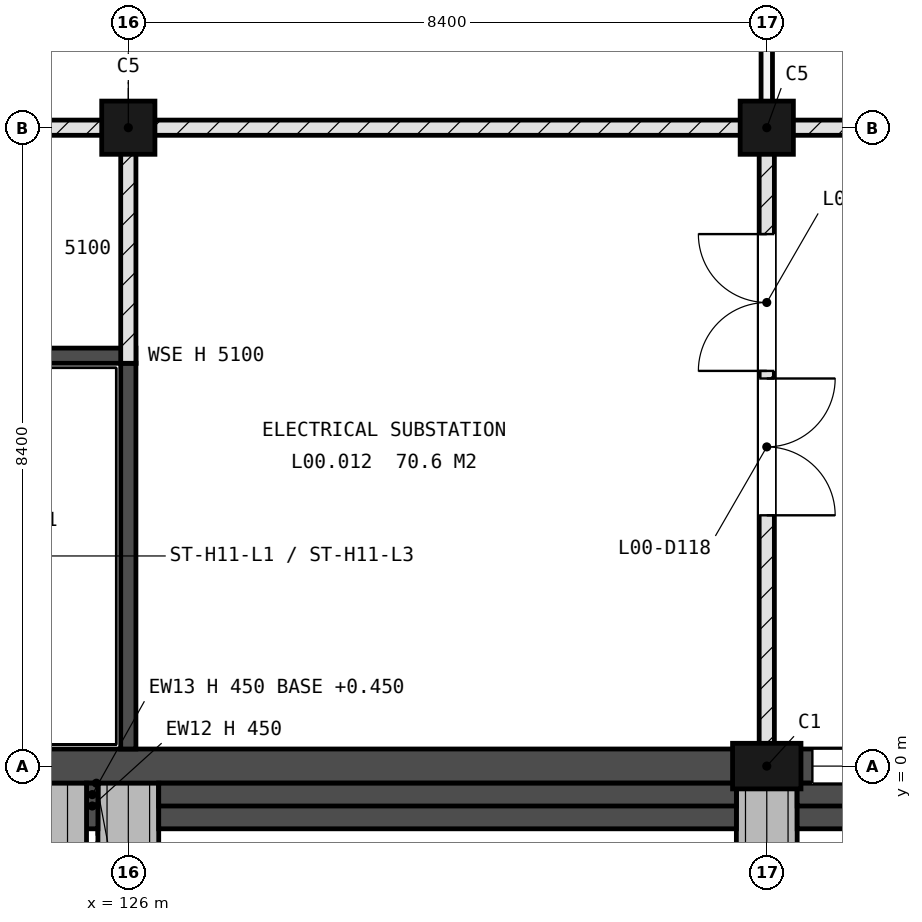
"""IFC4 building model, lengths in metres.
Left out: names, types, materials, properties, quantities, classifications, styles, units other than length and angle.
Written with IfcOpenShell. Run it as: python <this file> out.ifc"""

import sys

from ifc_helpers import new_model, si_unit, direction, frame, frame_2d, origin, origin_2d, place, context, subcontext, project, spatial, rectangle, extrude, element, fill, save


model = new_model("IFC4")
c1 = context("Model", 3, precision=1e-05, world=origin(), true_north=direction((0.0, 1.0)))
c2 = subcontext(c1, "Body", "Model", "MODEL_VIEW")
j1 = project(units=[si_unit("LENGTHUNIT", "METRE"), si_unit("PLANEANGLEUNIT", "RADIAN")], contexts=[c1])
p1 = place(None, origin())
s1 = spatial("IfcSite", under=j1, at=p1, CompositionType="ELEMENT")
p2 = place(p1, origin())
s2 = spatial("IfcBuilding", under=s1, at=p2, CompositionType="ELEMENT")
p3 = place(p2, origin())
s3 = spatial("IfcBuildingStorey", under=s2, at=p3, CompositionType="ELEMENT", Elevation=0.0)
p4 = place(p3, frame((126.0, 8.4, -0.3), z_axis=(0.0, 0.0, 1.0), x_axis=(1.0, 0.0, 0.0)))
e1 = element("IfcColumn", 1, at=p4, inside=s3, PredefinedType="COLUMN", context=c2, shape_type="SweptSolid", body=[
    extrude(rectangle(XDim=0.7, YDim=0.7, at=origin_2d()), origin(), (0.0, 0.0, 1.0), 5.4),
])
p5 = place(p3, frame((134.4, 0.0, -0.3), z_axis=(0.0, 0.0, 1.0), x_axis=(1.0, 0.0, 0.0)))
e2 = element("IfcColumn", 2, at=p5, inside=s3, PredefinedType="PILASTER", context=c2, shape_type="SweptSolid", body=[
    extrude(rectangle(XDim=0.9, YDim=0.6, at=origin_2d()), origin(), (0.0, 0.0, 1.0), 5.4),
])
p6 = place(p3, frame((134.4, 8.4, -0.3), z_axis=(0.0, 0.0, 1.0), x_axis=(1.0, 0.0, 0.0)))
e3 = element("IfcColumn", 3, at=p6, inside=s3, PredefinedType="COLUMN", context=c2, shape_type="SweptSolid", body=[
    extrude(rectangle(XDim=0.7, YDim=0.7, at=origin_2d()), origin(), (0.0, 0.0, 1.0), 5.4),
])
p7 = place(p3, frame((0.0, 0.0, -0.3), z_axis=(0.0, 0.0, 1.0), x_axis=(1.0, 0.0, 0.0)))
e4 = element("IfcWall", 4, at=p7, inside=s3, PredefinedType="SOLIDWALL", context=c2, shape_type="SweptSolid", body=[
    extrude(rectangle(XDim=168.0, YDim=0.45, at=frame_2d((84.0, 0.0))), origin(), (0.0, 0.0, 1.0), 5.4),
])
p8 = place(p7, frame((34.8, 0.0, 2.7)))
e5 = element("IfcOpeningElement", 5, at=p8, cuts=e4, PredefinedType="OPENING", context=c2, shape_type="SweptSolid", body=[
    extrude(rectangle(XDim=1.8, YDim=1.2, at=frame_2d((0.9, 0.6))), frame((0.0, 0.235, 0.0), z_axis=(0.0, -1.0, 0.0), x_axis=(1.0, 0.0, 0.0)), (0.0, 0.0, 1.0), 0.47),
])
p9 = place(p7, frame((69.075, 0.0, 1.5)))
e6 = element("IfcOpeningElement", 6, at=p9, cuts=e4, PredefinedType="OPENING", context=c2, shape_type="SweptSolid", body=[
    extrude(rectangle(XDim=0.45, YDim=2.4, at=frame_2d((0.225, 1.2))), frame((0.0, 0.235, 0.0), z_axis=(0.0, -1.0, 0.0), x_axis=(1.0, 0.0, 0.0)), (0.0, 0.0, 1.0), 0.47),
])
p10 = place(p7, frame((73.275, 0.0, 1.5)))
e7 = element("IfcOpeningElement", 7, at=p10, cuts=e4, PredefinedType="OPENING", context=c2, shape_type="SweptSolid", body=[
    extrude(rectangle(XDim=0.45, YDim=2.4, at=frame_2d((0.225, 1.2))), frame((0.0, 0.235, 0.0), z_axis=(0.0, -1.0, 0.0), x_axis=(1.0, 0.0, 0.0)), (0.0, 0.0, 1.0), 0.47),
])
p11 = place(p7, frame((135.0, 0.0, 2.7)))
e8 = element("IfcOpeningElement", 8, at=p11, cuts=e4, PredefinedType="OPENING", context=c2, shape_type="SweptSolid", body=[
    extrude(rectangle(XDim=1.8, YDim=1.2, at=frame_2d((0.9, 0.6))), frame((0.0, 0.235, 0.0), z_axis=(0.0, -1.0, 0.0), x_axis=(1.0, 0.0, 0.0)), (0.0, 0.0, 1.0), 0.47),
])
p12 = place(p7, frame((144.0, 0.0, 2.7)))
e9 = element("IfcOpeningElement", 9, at=p12, cuts=e4, PredefinedType="OPENING", context=c2, shape_type="SweptSolid", body=[
    extrude(rectangle(XDim=1.8, YDim=1.2, at=frame_2d((0.9, 0.6))), frame((0.0, 0.235, 0.0), z_axis=(0.0, -1.0, 0.0), x_axis=(1.0, 0.0, 0.0)), (0.0, 0.0, 1.0), 0.47),
])
p13 = place(p7, frame((114.6, 0.0, 0.3), z_axis=(0.0, 0.0, 1.0), x_axis=(-1.0, 0.0, 0.0)))
e10 = element("IfcOpeningElement", 10, at=p13, cuts=e4, PredefinedType="OPENING", context=c2, shape_type="SweptSolid", body=[
    extrude(rectangle(XDim=2.1, YDim=2.2, at=frame_2d((1.05, 1.1))), frame((0.0, 0.235, 0.0), z_axis=(0.0, -1.0, 0.0), x_axis=(1.0, 0.0, 0.0)), (0.0, 0.0, 1.0), 0.47),
])
p14 = place(p7, frame((117.3, 0.0, 0.3), z_axis=(0.0, 0.0, 1.0), x_axis=(-1.0, 0.0, 0.0)))
e11 = element("IfcOpeningElement", 11, at=p14, cuts=e4, PredefinedType="OPENING", context=c2, shape_type="SweptSolid", body=[
    extrude(rectangle(XDim=2.1, YDim=2.2, at=frame_2d((1.05, 1.1))), frame((0.0, 0.235, 0.0), z_axis=(0.0, -1.0, 0.0), x_axis=(1.0, 0.0, 0.0)), (0.0, 0.0, 1.0), 0.47),
])
p15 = place(p7, frame((106.05, 0.0, 0.3), z_axis=(0.0, 0.0, 1.0), x_axis=(-1.0, 0.0, 0.0)))
e12 = element("IfcOpeningElement", 12, at=p15, cuts=e4, PredefinedType="OPENING", context=c2, shape_type="SweptSolid", body=[
    extrude(rectangle(XDim=2.1, YDim=2.2, at=frame_2d((1.05, 1.1))), frame((0.0, 0.235, 0.0), z_axis=(0.0, -1.0, 0.0), x_axis=(1.0, 0.0, 0.0)), (0.0, 0.0, 1.0), 0.47),
])
p16 = place(p7, frame((57.25, 0.0, 0.3), z_axis=(0.0, 0.0, 1.0), x_axis=(-1.0, 0.0, 0.0)))
e13 = element("IfcOpeningElement", 13, at=p16, cuts=e4, PredefinedType="OPENING", context=c2, shape_type="SweptSolid", body=[
    extrude(rectangle(XDim=2.1, YDim=2.2, at=frame_2d((1.05, 1.1))), frame((0.0, 0.235, 0.0), z_axis=(0.0, -1.0, 0.0), x_axis=(1.0, 0.0, 0.0)), (0.0, 0.0, 1.0), 0.47),
])
p17 = place(p7, frame((120.75, 0.0, 0.3), z_axis=(0.0, 0.0, 1.0), x_axis=(-1.0, 0.0, 0.0)))
e14 = element("IfcOpeningElement", 14, at=p17, cuts=e4, PredefinedType="OPENING", context=c2, shape_type="SweptSolid", body=[
    extrude(rectangle(XDim=2.1, YDim=2.2, at=frame_2d((1.05, 1.1))), frame((0.0, 0.235, 0.0), z_axis=(0.0, -1.0, 0.0), x_axis=(1.0, 0.0, 0.0)), (0.0, 0.0, 1.0), 0.47),
])
p18 = place(p7, frame((124.95, 0.0, 0.3), z_axis=(0.0, 0.0, 1.0), x_axis=(-1.0, 0.0, 0.0)))
e15 = element("IfcOpeningElement", 15, at=p18, cuts=e4, PredefinedType="OPENING", context=c2, shape_type="SweptSolid", body=[
    extrude(rectangle(XDim=2.1, YDim=2.2, at=frame_2d((1.05, 1.1))), frame((0.0, 0.235, 0.0), z_axis=(0.0, -1.0, 0.0), x_axis=(1.0, 0.0, 0.0)), (0.0, 0.0, 1.0), 0.47),
])
p19 = place(p7, frame((19.45, 0.0, 0.3), z_axis=(0.0, 0.0, 1.0), x_axis=(-1.0, 0.0, 0.0)))
e16 = element("IfcOpeningElement", 16, at=p19, cuts=e4, PredefinedType="OPENING", context=c2, shape_type="SweptSolid", body=[
    extrude(rectangle(XDim=2.1, YDim=2.2, at=frame_2d((1.05, 1.1))), frame((0.0, 0.235, 0.0), z_axis=(0.0, -1.0, 0.0), x_axis=(1.0, 0.0, 0.0)), (0.0, 0.0, 1.0), 0.47),
])
p20 = place(p7, frame((162.25, 0.0, 0.3), z_axis=(0.0, 0.0, 1.0), x_axis=(-1.0, 0.0, 0.0)))
e17 = element("IfcOpeningElement", 17, at=p20, cuts=e4, PredefinedType="OPENING", context=c2, shape_type="SweptSolid", body=[
    extrude(rectangle(XDim=2.1, YDim=2.2, at=frame_2d((1.05, 1.1))), frame((0.0, 0.235, 0.0), z_axis=(0.0, -1.0, 0.0), x_axis=(1.0, 0.0, 0.0)), (0.0, 0.0, 1.0), 0.47),
])
p21 = place(p7, frame((4.8, 0.0, 0.3), z_axis=(0.0, 0.0, 1.0), x_axis=(-1.0, 0.0, 0.0)))
e18 = element("IfcOpeningElement", 18, at=p21, cuts=e4, PredefinedType="OPENING", context=c2, shape_type="SweptSolid", body=[
    extrude(rectangle(XDim=1.2, YDim=2.2, at=frame_2d((0.6, 1.1))), frame((0.0, 0.235, 0.0), z_axis=(0.0, -1.0, 0.0), x_axis=(1.0, 0.0, 0.0)), (0.0, 0.0, 1.0), 0.47),
])
p22 = place(p7, frame((64.8, 0.0, 0.3), z_axis=(0.0, 0.0, 1.0), x_axis=(-1.0, 0.0, 0.0)))
e19 = element("IfcOpeningElement", 19, at=p22, cuts=e4, PredefinedType="OPENING", context=c2, shape_type="SweptSolid", body=[
    extrude(rectangle(XDim=1.2, YDim=2.2, at=frame_2d((0.6, 1.1))), frame((0.0, 0.235, 0.0), z_axis=(0.0, -1.0, 0.0), x_axis=(1.0, 0.0, 0.0)), (0.0, 0.0, 1.0), 0.47),
])
p23 = place(p7, frame((81.0, 0.0, 0.3), z_axis=(0.0, 0.0, 1.0), x_axis=(-1.0, 0.0, 0.0)))
e20 = element("IfcOpeningElement", 20, at=p23, cuts=e4, PredefinedType="OPENING", context=c2, shape_type="SweptSolid", body=[
    extrude(rectangle(XDim=2.4, YDim=2.4, at=frame_2d((1.2, 1.2))), frame((0.0, 0.235, 0.0), z_axis=(0.0, -1.0, 0.0), x_axis=(1.0, 0.0, 0.0)), (0.0, 0.0, 1.0), 0.47),
])
p24 = place(p7, frame((97.8, 0.0, 0.3), z_axis=(0.0, 0.0, 1.0), x_axis=(-1.0, 0.0, 0.0)))
e21 = element("IfcOpeningElement", 21, at=p24, cuts=e4, PredefinedType="OPENING", context=c2, shape_type="SweptSolid", body=[
    extrude(rectangle(XDim=2.4, YDim=2.4, at=frame_2d((1.2, 1.2))), frame((0.0, 0.235, 0.0), z_axis=(0.0, -1.0, 0.0), x_axis=(1.0, 0.0, 0.0)), (0.0, 0.0, 1.0), 0.47),
])
p25 = place(p7, frame((139.8, 0.0, 0.3), z_axis=(0.0, 0.0, 1.0), x_axis=(-1.0, 0.0, 0.0)))
e22 = element("IfcOpeningElement", 22, at=p25, cuts=e4, PredefinedType="OPENING", context=c2, shape_type="SweptSolid", body=[
    extrude(rectangle(XDim=2.4, YDim=2.1, at=frame_2d((1.2, 1.05))), frame((0.0, 0.235, 0.0), z_axis=(0.0, -1.0, 0.0), x_axis=(1.0, 0.0, 0.0)), (0.0, 0.0, 1.0), 0.47),
])
p26 = place(p7, frame((156.3, 0.0, 0.3), z_axis=(0.0, 0.0, 1.0), x_axis=(-1.0, 0.0, 0.0)))
e23 = element("IfcOpeningElement", 23, at=p26, cuts=e4, PredefinedType="OPENING", context=c2, shape_type="SweptSolid", body=[
    extrude(rectangle(XDim=1.8, YDim=2.2, at=frame_2d((0.9, 1.1))), frame((0.0, 0.235, 0.0), z_axis=(0.0, -1.0, 0.0), x_axis=(1.0, 0.0, 0.0)), (0.0, 0.0, 1.0), 0.47),
])
for number, where, z_axis, x_axis in (
    (24, (126.0, -0.225, 0.0), (0.0, 0.0, 1.0), (0.0, -1.0, 0.0)),
    (25, (134.4, -0.225, 0.0), (0.0, 0.0, 1.0), (0.0, -1.0, 0.0)),
):
    element("IfcWall", number, at=place(p3, frame(where, z_axis=z_axis, x_axis=x_axis)), inside=s3, PredefinedType="SOLIDWALL", context=c2, shape_type="SweptSolid", body=[
        extrude(rectangle(XDim=0.9, YDim=0.8, at=frame_2d((0.45, 0.0))), origin(), (0.0, 0.0, 1.0), 5.1),
    ])
p27 = place(p3, frame((125.45, -0.525, 0.0), z_axis=(0.0, 0.0, 1.0), x_axis=(1.0, 0.0, 0.0)))
e26 = element("IfcWall", 26, at=p27, inside=s3, PredefinedType="SOLIDWALL", context=c2, shape_type="SweptSolid", body=[
    extrude(rectangle(XDim=0.15, YDim=0.6, at=frame_2d((0.075, 0.0))), origin(), (0.0, 0.0, 1.0), 0.45),
])
p28 = place(p3, frame((125.45, -0.375, 0.45), z_axis=(0.0, 0.0, 1.0), x_axis=(1.0, 0.0, 0.0)))
e27 = element("IfcWall", 27, at=p28, inside=s3, PredefinedType="SOLIDWALL", context=c2, shape_type="SweptSolid", body=[
    extrude(rectangle(XDim=0.15, YDim=0.3, at=frame_2d((0.075, 0.0))), origin(), (0.0, 0.0, 1.0), 0.45),
])
p29 = place(p3, frame((126.4, -0.525, 0.0), z_axis=(0.0, 0.0, 1.0), x_axis=(1.0, 0.0, 0.0)))
e28 = element("IfcWall", 28, at=p29, inside=s3, PredefinedType="SOLIDWALL", context=c2, shape_type="SweptSolid", body=[
    extrude(rectangle(XDim=7.6, YDim=0.6, at=frame_2d((3.8, 0.0))), origin(), (0.0, 0.0, 1.0), 0.45),
])
p30 = place(p3, frame((126.4, -0.375, 0.45), z_axis=(0.0, 0.0, 1.0), x_axis=(1.0, 0.0, 0.0)))
e29 = element("IfcWall", 29, at=p30, inside=s3, PredefinedType="SOLIDWALL", context=c2, shape_type="SweptSolid", body=[
    extrude(rectangle(XDim=7.6, YDim=0.3, at=frame_2d((3.8, 0.0))), origin(), (0.0, 0.0, 1.0), 0.45),
])
p31 = place(p3, frame((134.8, -0.525, 0.0), z_axis=(0.0, 0.0, 1.0), x_axis=(1.0, 0.0, 0.0)))
e30 = element("IfcWall", 30, at=p31, inside=s3, PredefinedType="SOLIDWALL", context=c2, shape_type="SweptSolid", body=[
    extrude(rectangle(XDim=2.1, YDim=0.6, at=frame_2d((1.05, 0.0))), origin(), (0.0, 0.0, 1.0), 0.45),
])
p32 = place(p3, frame((134.8, -0.375, 0.45), z_axis=(0.0, 0.0, 1.0), x_axis=(1.0, 0.0, 0.0)))
e31 = element("IfcWall", 31, at=p32, inside=s3, PredefinedType="SOLIDWALL", context=c2, shape_type="SweptSolid", body=[
    extrude(rectangle(XDim=2.1, YDim=0.3, at=frame_2d((1.05, 0.0))), origin(), (0.0, 0.0, 1.0), 0.45),
])
p33 = place(p3, frame((125.2, -0.225, 0.0), z_axis=(0.0, 0.0, 1.0), x_axis=(0.0, -1.0, 0.0)))
e32 = element("IfcWall", 32, at=p33, inside=s3, PredefinedType="SOLIDWALL", context=c2, shape_type="SweptSolid", body=[
    extrude(rectangle(XDim=1.4, YDim=0.5, at=frame_2d((0.7, 0.0))), origin(), (0.0, 0.0, 1.0), 3.08),
])
p34 = place(p3, frame((117.5, 5.4, 0.0), z_axis=(0.0, 0.0, 1.0), x_axis=(1.0, 0.0, 0.0)))
e33 = element("IfcWall", 33, at=p34, inside=s3, PredefinedType="SHEAR", context=c2, shape_type="SweptSolid", body=[
    extrude(rectangle(XDim=8.6, YDim=0.2, at=frame_2d((4.3, 0.0))), origin(), (0.0, 0.0, 1.0), 5.1),
])
p35 = place(p3, frame((126.0, 0.225, 0.0), z_axis=(0.0, 0.0, 1.0), x_axis=(0.0, 1.0, 0.0)))
e34 = element("IfcWall", 34, at=p35, inside=s3, PredefinedType="SHEAR", context=c2, shape_type="SweptSolid", body=[
    extrude(rectangle(XDim=5.075, YDim=0.2, at=frame_2d((2.538, 0.0))), origin(), (0.0, 0.0, 1.0), 5.1),
])
p36 = place(p3, frame((117.6, 8.4, 0.0), z_axis=(0.0, 0.0, 1.0), x_axis=(1.0, 0.0, 0.0)))
e35 = element("IfcWall", 35, at=p36, inside=s3, PredefinedType="SOLIDWALL", context=c2, shape_type="SweptSolid", body=[
    extrude(rectangle(XDim=42.0, YDim=0.2, at=frame_2d((21.0, 0.0))), origin(), (0.0, 0.0, 1.0), 4.3),
])
p37 = place(p36, frame((37.3, 0.0, 0.0)))
e36 = element("IfcOpeningElement", 36, at=p37, cuts=e35, PredefinedType="OPENING", context=c2, shape_type="SweptSolid", body=[
    extrude(rectangle(XDim=1.0, YDim=2.1, at=frame_2d((0.5, 1.05))), frame((0.0, 0.11, 0.0), z_axis=(0.0, -1.0, 0.0), x_axis=(1.0, 0.0, 0.0)), (0.0, 0.0, 1.0), 0.22),
])
p38 = place(p3, frame((126.0, 5.3, 0.0), z_axis=(0.0, 0.0, 1.0), x_axis=(0.0, 1.0, 0.0)))
e37 = element("IfcWall", 37, at=p38, inside=s3, PredefinedType="SOLIDWALL", context=c2, shape_type="SweptSolid", body=[
    extrude(rectangle(XDim=3.0, YDim=0.2, at=frame_2d((1.5, 0.0))), origin(), (0.0, 0.0, 1.0), 5.1),
])
p39 = place(p3, frame((134.4, 0.225, 0.0), z_axis=(0.0, 0.0, 1.0), x_axis=(0.0, 1.0, 0.0)))
e38 = element("IfcWall", 38, at=p39, inside=s3, PredefinedType="SOLIDWALL", context=c2, shape_type="SweptSolid", body=[
    extrude(rectangle(XDim=8.075, YDim=0.2, at=frame_2d((4.038, 0.0))), origin(), (0.0, 0.0, 1.0), 4.3),
])
p40 = place(p39, frame((3.075, 0.0, 0.0)))
e39 = element("IfcOpeningElement", 39, at=p40, cuts=e38, PredefinedType="OPENING", context=c2, shape_type="SweptSolid", body=[
    extrude(rectangle(XDim=1.8, YDim=2.4, at=frame_2d((0.9, 1.2))), frame((0.0, 0.11, 0.0), z_axis=(0.0, -1.0, 0.0), x_axis=(1.0, 0.0, 0.0)), (0.0, 0.0, 1.0), 0.22),
])
p41 = place(p39, frame((4.975, 0.0, 0.0)))
e40 = element("IfcOpeningElement", 40, at=p41, cuts=e38, PredefinedType="OPENING", context=c2, shape_type="SweptSolid", body=[
    extrude(rectangle(XDim=1.8, YDim=2.4, at=frame_2d((0.9, 1.2))), frame((0.0, 0.11, 0.0), z_axis=(0.0, -1.0, 0.0), x_axis=(1.0, 0.0, 0.0)), (0.0, 0.0, 1.0), 0.22),
])
p42 = place(p3, frame((134.4, 8.5, 0.0), z_axis=(0.0, 0.0, 1.0), x_axis=(0.0, 1.0, 0.0)))
e41 = element("IfcWall", 41, at=p42, inside=s3, PredefinedType="PARTITIONING", context=c2, shape_type="SweptSolid", body=[
    extrude(rectangle(XDim=16.625, YDim=0.15, at=frame_2d((8.312, 0.0))), origin(), (0.0, 0.0, 1.0), 4.3),
])
p43 = place(p42, frame((1.64, 0.0, 0.0)))
e42 = element("IfcOpeningElement", 42, at=p43, cuts=e41, PredefinedType="OPENING", context=c2, shape_type="SweptSolid", body=[
    extrude(rectangle(XDim=1.0, YDim=2.1, at=frame_2d((0.5, 1.05))), frame((0.0, 0.085, 0.0), z_axis=(0.0, -1.0, 0.0), x_axis=(1.0, 0.0, 0.0)), (0.0, 0.0, 1.0), 0.17),
])
p44 = place(p11, origin())
e43 = element("IfcWindow", 43, at=p44, inside=s3, PartitioningType="SINGLE_PANEL", PredefinedType="WINDOW", context=c2, shape_type="SweptSolid", body=[
    extrude(rectangle(XDim=1.8, YDim=1.2, at=frame_2d((0.9, 0.6))), frame((0.0, 0.03, 0.0), z_axis=(0.0, -1.0, 0.0), x_axis=(1.0, 0.0, 0.0)), (0.0, 0.0, 1.0), 0.06),
])
fill(e8, e43)
p45 = place(p40, origin())
e44 = element("IfcDoor", 44, at=p45, inside=s3, OperationType="DOUBLE_DOOR_SINGLE_SWING", PredefinedType="DOOR", context=c2, shape_type="SweptSolid", body=[
    extrude(rectangle(XDim=1.8, YDim=2.4, at=frame_2d((0.9, 1.2))), frame((0.0, 0.025, 0.0), z_axis=(0.0, -1.0, 0.0), x_axis=(1.0, 0.0, 0.0)), (0.0, 0.0, 1.0), 0.05),
])
fill(e39, e44)
p46 = place(p41, origin())
e45 = element("IfcDoor", 45, at=p46, inside=s3, OperationType="DOUBLE_DOOR_SINGLE_SWING", PredefinedType="DOOR", context=c2, shape_type="SweptSolid", body=[
    extrude(rectangle(XDim=1.8, YDim=2.4, at=frame_2d((0.9, 1.2))), frame((0.0, 0.025, 0.0), z_axis=(0.0, -1.0, 0.0), x_axis=(1.0, 0.0, 0.0)), (0.0, 0.0, 1.0), 0.05),
])
fill(e40, e45)
save(model, sys.argv[1])
